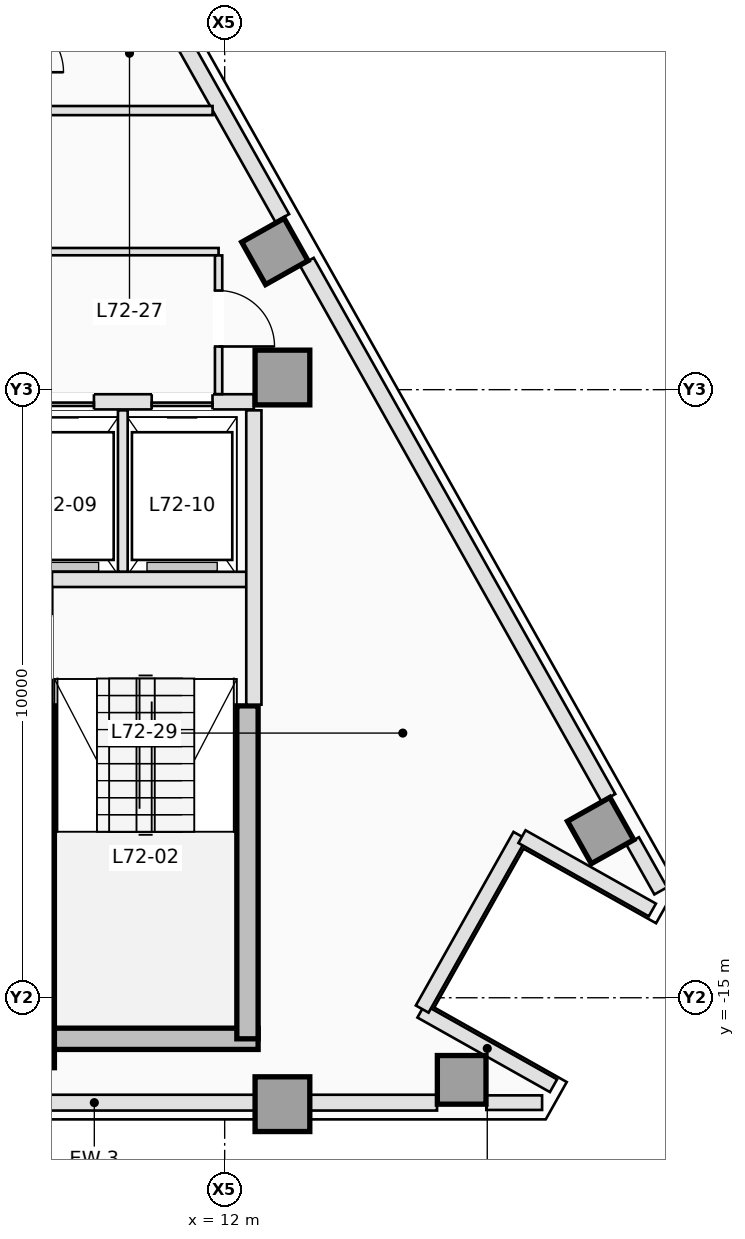
"""IFC4 building model, lengths in metres.
Left out: names, types, materials, properties, quantities, classifications, styles, units other than length and angle.
Written with IfcOpenShell. Run it as: python <this file> out.ifc"""

import sys

from ifc_helpers import new_model, si_unit, direction, frame, frame_2d, origin, origin_2d, place, context, subcontext, project, spatial, rectangle, extrude, element, fill, save


model = new_model("IFC4")
c1 = context("Model", 3, precision=1e-05, world=origin(), true_north=direction((0.0, 1.0)))
c2 = subcontext(c1, "Body", "Model", "MODEL_VIEW")
j1 = project(units=[si_unit("LENGTHUNIT", "METRE"), si_unit("PLANEANGLEUNIT", "RADIAN")], contexts=[c1])
p1 = place(None, origin())
s1 = spatial("IfcSite", under=j1, at=p1, CompositionType="ELEMENT")
p2 = place(p1, origin())
s2 = spatial("IfcBuilding", under=s1, at=p2, CompositionType="ELEMENT")
p3 = place(p2, frame((0.0, 0.0, 260.4)))
s3 = spatial("IfcBuildingStorey", under=s2, at=p3, CompositionType="ELEMENT", Elevation=260.4)
p4 = place(p3, frame((8.85, -15.675, 0.0), z_axis=(0.0, 0.0, 1.0), x_axis=(1.0, 0.0, 0.0)))
e1 = element("IfcWall", 1, at=p4, inside=s3, PredefinedType="SHEAR", context=c2, shape_type="SweptSolid", body=[
    extrude(rectangle(XDim=3.7, YDim=0.35, at=frame_2d((1.85, 0.0))), origin(), (0.0, 0.0, 1.0), 3.5),
])
p5 = place(p3, frame((12.375, -15.675, 0.0), z_axis=(0.0, 0.0, 1.0), x_axis=(0.0, 1.0, 0.0)))
e2 = element("IfcWall", 2, at=p5, inside=s3, PredefinedType="SHEAR", context=c2, shape_type="SweptSolid", body=[
    extrude(rectangle(XDim=5.475, YDim=0.35, at=frame_2d((2.738, 0.0))), origin(), (0.0, 0.0, 1.0), 3.5),
])
p6 = place(p3, frame((9.025, -16.15, 0.0), z_axis=(0.0, 0.0, 1.0), x_axis=(0.0, 1.0, 0.0)))
e3 = element("IfcWall", 3, at=p6, inside=s3, PredefinedType="SHEAR", context=c2, shape_type="SweptSolid", body=[
    extrude(rectangle(XDim=5.95, YDim=0.35, at=frame_2d((2.975, 0.0))), origin(), (0.0, 0.0, 1.0), 3.5),
])
for number, where, z_axis, x_axis in (
    (4, (12.95, -16.75, 0.0), (0.0, 0.0, 1.0), (1.0, 0.0, 0.0)),
    (5, (12.95, -4.8, 0.0), (0.0, 0.0, 1.0), (1.0, 0.0, 0.0)),
):
    element("IfcColumn", number, at=place(p3, frame(where, z_axis=z_axis, x_axis=x_axis)), inside=s3, PredefinedType="COLUMN", context=c2, shape_type="SweptSolid", body=[
        extrude(rectangle(XDim=0.9, YDim=0.9, at=origin_2d()), origin(), (0.0, 0.0, 1.0), 3.5),
    ])
for number, where, z_axis, x_axis in (
    (6, (15.898, -16.35, 0.0), (0.0, 0.0, 1.0), (0.0, 1.0, 0.0)),
    (7, (18.182, -12.25, 0.0), (0.0, 0.0, 1.0), (0.872, 0.49, 0.0)),
    (8, (12.825, -2.727, 0.0), (0.0, 0.0, 1.0), (0.872, 0.49, 0.0)),
):
    element("IfcColumn", number, at=place(p3, frame(where, z_axis=z_axis, x_axis=x_axis)), inside=s3, PredefinedType="COLUMN", context=c2, shape_type="SweptSolid", body=[
        extrude(rectangle(XDim=0.8, YDim=0.8, at=origin_2d()), origin(), (0.0, 0.0, 1.0), 3.5),
    ])
p7 = place(p3, frame((17.22, -16.725, 0.0), z_axis=(0.0, 0.0, 1.0), x_axis=(-1.0, 0.0, 0.0)))
e9 = element("IfcWall", 9, at=p7, inside=s3, PredefinedType="STANDARD", context=c2, shape_type="SweptSolid", body=[
    extrude(rectangle(XDim=0.917, YDim=0.24, at=frame_2d((0.459, 0.0))), origin(), (0.0, 0.0, 1.0), 3.25),
])
p8 = place(p3, frame((15.493, -16.725, 0.0), z_axis=(0.0, 0.0, 1.0), x_axis=(-1.0, 0.0, 0.0)))
e10 = element("IfcWall", 10, at=p8, inside=s3, PredefinedType="STANDARD", context=c2, shape_type="SweptSolid", body=[
    extrude(rectangle(XDim=11.273, YDim=0.26, at=frame_2d((5.636, 0.0))), origin(), (0.0, 0.0, 1.0), 2.79),
])
p9 = place(p3, frame((18.708, -12.419, 0.0), z_axis=(0.0, 0.0, 1.0), x_axis=(0.490199895283, -0.871610040479, 0.0)))
e11 = element("IfcWall", 11, at=p9, inside=s3, PredefinedType="STANDARD", context=c2, shape_type="SweptSolid", body=[
    extrude(rectangle(XDim=0.945, YDim=0.24, at=frame_2d((0.472, 0.0))), origin(), (0.0, 0.0, 1.0), 3.25),
])
p10 = place(p3, frame((13.351, -2.896, 0.0), z_axis=(0.0, 0.0, 1.0), x_axis=(0.490266968583, -0.871572314565, 0.0)))
e12 = element("IfcWall", 12, at=p10, inside=s3, PredefinedType="STANDARD", context=c2, shape_type="SweptSolid", body=[
    extrude(rectangle(XDim=10.116, YDim=0.26, at=frame_2d((5.058, 0.0))), origin(), (0.0, 0.0, 1.0), 3.25),
])
p11 = place(p3, frame((10.869, 1.516, 0.0), z_axis=(0.0, 0.0, 1.0), x_axis=(0.490244825075, -0.871584770109, 0.0)))
e13 = element("IfcWall", 13, at=p11, inside=s3, PredefinedType="STANDARD", context=c2, shape_type="SweptSolid", body=[
    extrude(rectangle(XDim=4.237, YDim=0.26, at=frame_2d((2.119, 0.0))), origin(), (0.0, 0.0, 1.0), 3.25),
])
p12 = place(p3, frame((17.408, -16.447, 0.0), z_axis=(0.0, 0.0, 1.0), x_axis=(-0.871588577066, 0.490238056792, 0.0)))
e14 = element("IfcWall", 14, at=p12, inside=s3, PredefinedType="STANDARD", context=c2, shape_type="SweptSolid", body=[
    extrude(rectangle(XDim=2.5, YDim=0.24, at=frame_2d((1.25, 0.0))), origin(), (0.0, 0.0, 1.0), 3.25),
])
p13 = place(p3, frame((15.248, -15.186, 0.0), z_axis=(0.0, 0.0, 1.0), x_axis=(0.490293083368, 0.871557624258, 0.0)))
e15 = element("IfcWall", 15, at=p13, inside=s3, PredefinedType="STANDARD", context=c2, shape_type="SweptSolid", body=[
    extrude(rectangle(XDim=3.276, YDim=0.24, at=frame_2d((1.638, 0.0))), origin(), (0.0, 0.0, 1.0), 2.79),
])
p14 = place(p3, frame((16.889, -12.35, 0.0), z_axis=(0.0, 0.0, 1.0), x_axis=(0.87157023615, -0.490270663468, 0.0)))
e16 = element("IfcWall", 16, at=p14, inside=s3, PredefinedType="STANDARD", context=c2, shape_type="SweptSolid", body=[
    extrude(rectangle(XDim=2.46, YDim=0.24, at=frame_2d((1.23, 0.0))), origin(), (0.0, 0.0, 1.0), 3.25),
])
p15 = place(p3, frame((9.16, -8.12, 0.0), z_axis=(0.0, 0.0, 1.0), x_axis=(1.0, 0.0, 0.0)))
e17 = element("IfcWall", 17, at=p15, inside=s3, PredefinedType="PARTITIONING", context=c2, shape_type="SweptSolid", body=[
    extrude(rectangle(XDim=3.22, YDim=0.25, at=frame_2d((1.61, 0.0))), origin(), (0.0, 0.0, 1.0), 3.25),
])
p16 = place(p3, frame((12.48, -10.18, 0.0), z_axis=(0.0, 0.0, 1.0), x_axis=(0.0, 1.0, 0.0)))
e18 = element("IfcWall", 18, at=p16, inside=s3, PredefinedType="PARTITIONING", context=c2, shape_type="SweptSolid", body=[
    extrude(rectangle(XDim=4.84, YDim=0.25, at=frame_2d((2.42, 0.0))), origin(), (0.0, 0.0, 1.0), 3.25),
])
p17 = place(p3, frame((4.202, -5.2, 0.0), z_axis=(0.0, 0.0, 1.0), x_axis=(1.0, 0.0, 0.0)))
e19 = element("IfcWall", 19, at=p17, inside=s3, PredefinedType="PARTITIONING", context=c2, shape_type="SweptSolid", body=[
    extrude(rectangle(XDim=8.278, YDim=0.25, at=frame_2d((4.139, 0.0))), origin(), (0.0, 0.0, 1.0), 3.25),
])
p18 = place(p17, frame((0.748, 0.0, 0.0)))
e20 = element("IfcOpeningElement", 20, at=p18, cuts=e19, PredefinedType="OPENING", context=c2, shape_type="SweptSolid", body=[
    extrude(rectangle(XDim=1.0, YDim=2.15, at=frame_2d((0.5, 1.075))), frame((0.0, 0.135, 0.0), z_axis=(0.0, -1.0, 0.0), x_axis=(1.0, 0.0, 0.0)), (0.0, 0.0, 1.0), 0.27),
])
p19 = place(p17, frame((2.698, 0.0, 0.0)))
e21 = element("IfcOpeningElement", 21, at=p19, cuts=e19, PredefinedType="OPENING", context=c2, shape_type="SweptSolid", body=[
    extrude(rectangle(XDim=1.0, YDim=2.15, at=frame_2d((0.5, 1.075))), frame((0.0, 0.135, 0.0), z_axis=(0.0, -1.0, 0.0), x_axis=(1.0, 0.0, 0.0)), (0.0, 0.0, 1.0), 0.27),
])
p20 = place(p17, frame((4.648, 0.0, 0.0)))
e22 = element("IfcOpeningElement", 22, at=p20, cuts=e19, PredefinedType="OPENING", context=c2, shape_type="SweptSolid", body=[
    extrude(rectangle(XDim=1.0, YDim=2.15, at=frame_2d((0.5, 1.075))), frame((0.0, 0.135, 0.0), z_axis=(0.0, -1.0, 0.0), x_axis=(1.0, 0.0, 0.0)), (0.0, 0.0, 1.0), 0.27),
])
p21 = place(p17, frame((6.598, 0.0, 0.0)))
e23 = element("IfcOpeningElement", 23, at=p21, cuts=e19, PredefinedType="OPENING", context=c2, shape_type="SweptSolid", body=[
    extrude(rectangle(XDim=1.0, YDim=2.15, at=frame_2d((0.5, 1.075))), frame((0.0, 0.135, 0.0), z_axis=(0.0, -1.0, 0.0), x_axis=(1.0, 0.0, 0.0)), (0.0, 0.0, 1.0), 0.27),
])
p22 = place(p3, frame((10.325, -7.993, 0.0), z_axis=(0.0, 0.0, 1.0), x_axis=(0.0, 1.0, 0.0)))
e24 = element("IfcWall", 24, at=p22, inside=s3, PredefinedType="PARTITIONING", context=c2, shape_type="SweptSolid", body=[
    extrude(rectangle(XDim=2.653, YDim=0.16, at=frame_2d((1.326, 0.0))), origin(), (0.0, 0.0, 1.0), 3.25),
])
p23 = place(p3, frame((8.492, -2.73, 0.0), z_axis=(0.0, 0.0, 1.0), x_axis=(1.0, 0.0, 0.0)))
e25 = element("IfcWall", 25, at=p23, inside=s3, PredefinedType="PARTITIONING", context=c2, shape_type="SweptSolid", body=[
    extrude(rectangle(XDim=3.408, YDim=0.12, at=frame_2d((1.704, 0.0))), origin(), (0.0, 0.0, 1.0), 3.25),
])
p24 = place(p3, frame((11.9, -2.792, 0.0), z_axis=(0.0, 0.0, 1.0), x_axis=(0.0, -1.0, 0.0)))
e26 = element("IfcWall", 26, at=p24, inside=s3, PredefinedType="PARTITIONING", context=c2, shape_type="SweptSolid", body=[
    extrude(rectangle(XDim=2.281, YDim=0.12, at=frame_2d((1.141, 0.0))), origin(), (0.0, 0.0, 1.0), 3.25),
])
p25 = place(p24, frame((0.578, 0.0, 0.0)))
e27 = element("IfcOpeningElement", 27, at=p25, cuts=e26, PredefinedType="OPENING", context=c2, shape_type="SweptSolid", body=[
    extrude(rectangle(XDim=0.92, YDim=2.12, at=frame_2d((0.46, 1.06))), frame((0.0, 0.07, 0.0), z_axis=(0.0, -1.0, 0.0), x_axis=(1.0, 0.0, 0.0)), (0.0, 0.0, 1.0), 0.14),
])
p26 = place(p3, frame((11.801, -0.41, 0.0), z_axis=(0.0, 0.0, 1.0), x_axis=(-1.0, 0.0, 0.0)))
e28 = element("IfcWall", 28, at=p26, inside=s3, PredefinedType="PARTITIONING", context=c2, shape_type="SweptSolid", body=[
    extrude(rectangle(XDim=3.261, YDim=0.15, at=frame_2d((1.631, 0.0))), origin(), (0.0, 0.0, 1.0), 3.25),
])
p27 = place(p20, origin())
e29 = element("IfcDoor", 29, at=p27, inside=s3, OperationType="SLIDING_TO_RIGHT", PredefinedType="DOOR", context=c2, shape_type="SweptSolid", body=[
    extrude(rectangle(XDim=1.0, YDim=2.15, at=frame_2d((0.5, 1.075))), frame((0.0, 0.025, 0.0), z_axis=(0.0, -1.0, 0.0), x_axis=(1.0, 0.0, 0.0)), (0.0, 0.0, 1.0), 0.05),
])
fill(e22, e29)
p28 = place(p21, origin())
e30 = element("IfcDoor", 30, at=p28, inside=s3, OperationType="SLIDING_TO_RIGHT", PredefinedType="DOOR", context=c2, shape_type="SweptSolid", body=[
    extrude(rectangle(XDim=1.0, YDim=2.15, at=frame_2d((0.5, 1.075))), frame((0.0, 0.025, 0.0), z_axis=(0.0, -1.0, 0.0), x_axis=(1.0, 0.0, 0.0)), (0.0, 0.0, 1.0), 0.05),
])
fill(e23, e30)
p29 = place(p25, origin())
e31 = element("IfcDoor", 31, at=p29, inside=s3, OperationType="SINGLE_SWING_RIGHT", PredefinedType="DOOR", context=c2, shape_type="SweptSolid", body=[
    extrude(rectangle(XDim=0.92, YDim=2.12, at=frame_2d((0.46, 1.06))), frame((0.0, 0.025, 0.0), z_axis=(0.0, -1.0, 0.0), x_axis=(1.0, 0.0, 0.0)), (0.0, 0.0, 1.0), 0.05),
])
fill(e27, e31)
save(model, sys.argv[1])
